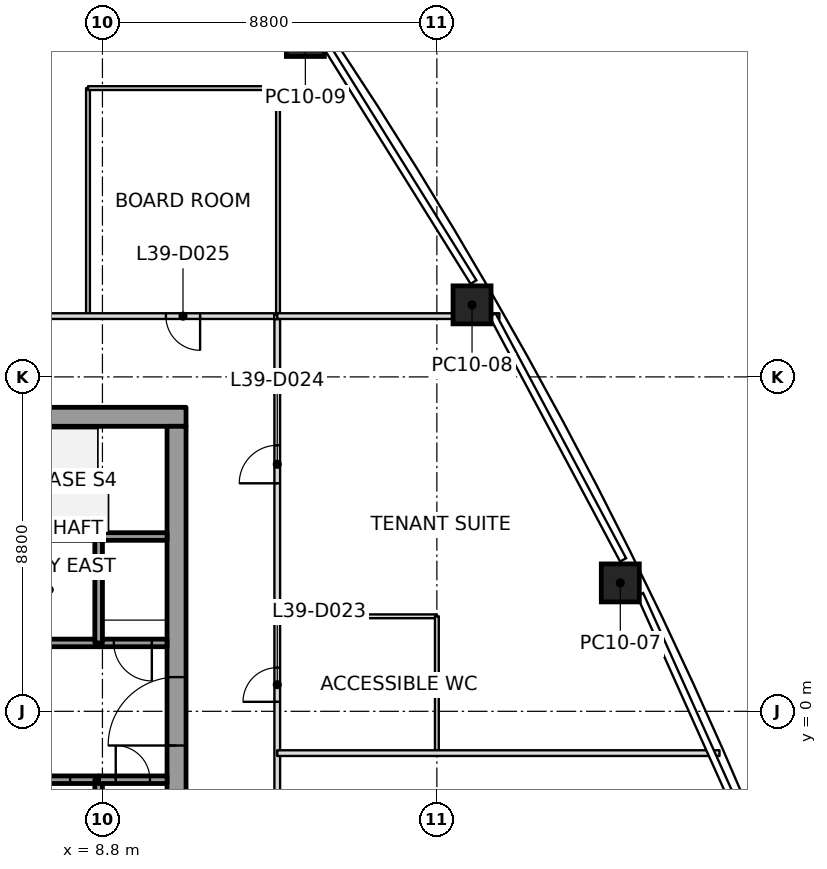
"""IFC4 building model, lengths in metres.
Left out: names, types, materials, properties, quantities, classifications, styles, units other than length and angle.
Written with IfcOpenShell. Run it as: python <this file> out.ifc"""

import sys

from ifc_helpers import new_model, si_unit, direction, frame, frame_2d, origin, origin_2d, place, context, subcontext, project, spatial, rectangle, extrude, element, fill, save


model = new_model("IFC4")
c1 = context("Model", 3, precision=1e-05, world=origin(), true_north=direction((0.0, 1.0)))
c2 = subcontext(c1, "Body", "Model", "MODEL_VIEW")
j1 = project(units=[si_unit("LENGTHUNIT", "METRE"), si_unit("PLANEANGLEUNIT", "RADIAN")], contexts=[c1])
p1 = place(None, origin())
s1 = spatial("IfcSite", under=j1, at=p1, CompositionType="ELEMENT")
p2 = place(p1, origin())
s2 = spatial("IfcBuilding", under=s1, at=p2, CompositionType="ELEMENT")
p3 = place(p2, frame((0.0, 0.0, 177.8)))
s3 = spatial("IfcBuildingStorey", under=s2, at=p3, CompositionType="ELEMENT", Elevation=177.8)
p4 = place(p3, frame((22.427, 3.379, 0.0), z_axis=(-0.014097689605, 0.002074984617, 0.999898469639), x_axis=(-0.440365548951, 0.897782283565, -0.008071840787)))
e1 = element("IfcColumn", 1, at=p4, inside=s3, PredefinedType="COLUMN", context=c2, shape_type="SweptSolid", body=[
    extrude(rectangle(XDim=1.0, YDim=1.0, at=origin_2d()), origin(), (0.0, 0.0, 1.0), 4.0),
])
p5 = place(p3, frame((18.525, 10.696, 0.0), z_axis=(-0.009887049298, -0.00573692984, 0.999934664812), x_axis=(-0.499975560967, 0.866039512843, 2.5126546e-05)))
e2 = element("IfcColumn", 2, at=p5, inside=s3, PredefinedType="COLUMN", context=c2, shape_type="SweptSolid", body=[
    extrude(rectangle(XDim=1.0, YDim=1.0, at=origin_2d()), origin(), (0.0, 0.0, 1.0), 4.0),
])
p6 = place(p3, frame((14.139, 17.733, 0.0), z_axis=(-0.005248490815, -0.013243284963, 0.999898529226), x_axis=(-0.557302763057, 0.830270127134, 0.008071324461)))
e3 = element("IfcColumn", 3, at=p6, inside=s3, PredefinedType="COLUMN", context=c2, shape_type="SweptSolid", body=[
    extrude(rectangle(XDim=1.0, YDim=1.0, at=origin_2d()), origin(), (0.0, 0.0, 1.0), 4.0),
])
p7 = place(p3, frame((-11.0, 7.75, 0.0), z_axis=(0.0, 0.0, 1.0), x_axis=(1.0, 0.0, 0.0)))
e4 = element("IfcWall", 4, at=p7, inside=s3, PredefinedType="SHEAR", context=c2, shape_type="SweptSolid", body=[
    extrude(rectangle(XDim=22.0, YDim=0.5, at=frame_2d((11.0, 0.0))), origin(), (0.0, 0.0, 1.0), 4.0),
])
p8 = place(p7, frame((10.45, 0.0, 0.0)))
e5 = element("IfcOpeningElement", 5, at=p8, cuts=e4, PredefinedType="OPENING", context=c2, shape_type="SweptSolid", body=[
    extrude(rectangle(XDim=1.1, YDim=2.1, at=frame_2d((0.55, 1.05))), frame((0.0, 0.25, 0.0), z_axis=(0.0, -1.0, 0.0), x_axis=(1.0, 0.0, 0.0)), (0.0, 0.0, 1.0), 0.5),
])
p9 = place(p3, frame((10.75, -7.5, 0.0), z_axis=(0.0, 0.0, 1.0), x_axis=(0.0, 1.0, 0.0)))
e6 = element("IfcWall", 6, at=p9, inside=s3, PredefinedType="SHEAR", context=c2, shape_type="SweptSolid", body=[
    extrude(rectangle(XDim=15.0, YDim=0.5, at=frame_2d((7.5, 0.0))), origin(), (0.0, 0.0, 1.0), 4.0),
])
p10 = place(p9, frame((6.6, 0.0, 0.0)))
e7 = element("IfcOpeningElement", 7, at=p10, cuts=e6, PredefinedType="OPENING", context=c2, shape_type="SweptSolid", body=[
    extrude(rectangle(XDim=1.8, YDim=2.1, at=frame_2d((0.9, 1.05))), frame((0.0, 0.25, 0.0), z_axis=(0.0, -1.0, 0.0), x_axis=(1.0, 0.0, 0.0)), (0.0, 0.0, 1.0), 0.5),
])
p11 = place(p3, frame((6.1, -1.8, 0.0), z_axis=(0.0, 0.0, 1.0), x_axis=(1.0, 0.0, 0.0)))
e8 = element("IfcWall", 8, at=p11, inside=s3, PredefinedType="SOLIDWALL", context=c2, shape_type="SweptSolid", body=[
    extrude(rectangle(XDim=2.6, YDim=0.2, at=frame_2d((1.3, 0.0))), origin(), (0.0, 0.0, 1.0), 3.85),
])
p12 = place(p11, frame((0.75, 0.0, 0.0)))
e9 = element("IfcOpeningElement", 9, at=p12, cuts=e8, PredefinedType="OPENING", context=c2, shape_type="SweptSolid", body=[
    extrude(rectangle(XDim=1.1, YDim=2.1, at=frame_2d((0.55, 1.05))), frame((0.0, 0.1, 0.0), z_axis=(0.0, -1.0, 0.0), x_axis=(1.0, 0.0, 0.0)), (0.0, 0.0, 1.0), 0.2),
])
for number, where, z_axis, x_axis in (
    (10, (8.7, 1.8, 0.0), (0.0, 0.0, 1.0), (-1.0, 0.0, 0.0)),
    (11, (8.7, 4.6, 0.0), (0.0, 0.0, 1.0), (-1.0, 0.0, 0.0)),
):
    element("IfcWall", number, at=place(p3, frame(where, z_axis=z_axis, x_axis=x_axis)), inside=s3, PredefinedType="SOLIDWALL", context=c2, shape_type="SweptSolid", body=[
        extrude(rectangle(XDim=2.6, YDim=0.2, at=frame_2d((1.3, 0.0))), origin(), (0.0, 0.0, 1.0), 3.85),
    ])
p13 = place(p3, frame((8.7, -1.8, 0.0), z_axis=(0.0, 0.0, 1.0), x_axis=(0.0, -1.0, 0.0)))
e12 = element("IfcWall", 12, at=p13, inside=s3, PredefinedType="SOLIDWALL", context=c2, shape_type="SweptSolid", body=[
    extrude(rectangle(XDim=2.8, YDim=0.2, at=frame_2d((1.4, 0.0))), origin(), (0.0, 0.0, 1.0), 3.85),
])
p14 = place(p3, frame((8.7, -1.8, 0.0), z_axis=(0.0, 0.0, 1.0), x_axis=(1.0, 0.0, 0.0)))
e13 = element("IfcWall", 13, at=p14, inside=s3, PredefinedType="SOLIDWALL", context=c2, shape_type="SweptSolid", body=[
    extrude(rectangle(XDim=1.8, YDim=0.2, at=frame_2d((0.9, 0.0))), origin(), (0.0, 0.0, 1.0), 3.85),
])
p15 = place(p14, frame((0.45, 0.0, 0.0)))
e14 = element("IfcOpeningElement", 14, at=p15, cuts=e13, PredefinedType="OPENING", context=c2, shape_type="SweptSolid", body=[
    extrude(rectangle(XDim=0.9, YDim=2.1, at=frame_2d((0.45, 1.05))), frame((0.0, 0.1, 0.0), z_axis=(0.0, -1.0, 0.0), x_axis=(1.0, 0.0, 0.0)), (0.0, 0.0, 1.0), 0.2),
])
p16 = place(p3, frame((10.5, 1.8, 0.0), z_axis=(0.0, 0.0, 1.0), x_axis=(-1.0, 0.0, 0.0)))
e15 = element("IfcWall", 15, at=p16, inside=s3, PredefinedType="SOLIDWALL", context=c2, shape_type="SweptSolid", body=[
    extrude(rectangle(XDim=1.8, YDim=0.2, at=frame_2d((0.9, 0.0))), origin(), (0.0, 0.0, 1.0), 3.85),
])
p17 = place(p16, frame((0.4, 0.0, 0.0)))
e16 = element("IfcOpeningElement", 16, at=p17, cuts=e15, PredefinedType="OPENING", context=c2, shape_type="SweptSolid", body=[
    extrude(rectangle(XDim=1.0, YDim=2.1, at=frame_2d((0.5, 1.05))), frame((0.0, 0.1, 0.0), z_axis=(0.0, -1.0, 0.0), x_axis=(1.0, 0.0, 0.0)), (0.0, 0.0, 1.0), 0.2),
])
p18 = place(p3, frame((8.7, 4.6, 0.0), z_axis=(0.0, 0.0, 1.0), x_axis=(0.0, -1.0, 0.0)))
e17 = element("IfcWall", 17, at=p18, inside=s3, PredefinedType="SOLIDWALL", context=c2, shape_type="SweptSolid", body=[
    extrude(rectangle(XDim=2.8, YDim=0.2, at=frame_2d((1.4, 0.0))), origin(), (0.0, 0.0, 1.0), 3.85),
])
p19 = place(p3, frame((10.5, 4.6, 0.0), z_axis=(0.0, 0.0, 1.0), x_axis=(-1.0, 0.0, 0.0)))
e18 = element("IfcWall", 18, at=p19, inside=s3, PredefinedType="SOLIDWALL", context=c2, shape_type="SweptSolid", body=[
    extrude(rectangle(XDim=1.8, YDim=0.2, at=frame_2d((0.9, 0.0))), origin(), (0.0, 0.0, 1.0), 3.85),
])
p20 = place(p3, frame((25.037, -1.1, 0.0), z_axis=(0.0, 0.0, 1.0), x_axis=(-1.0, 0.0, 0.0)))
e19 = element("IfcWall", 19, at=p20, inside=s3, PredefinedType="PARTITIONING", context=c2, shape_type="SweptSolid", body=[
    extrude(rectangle(XDim=11.637, YDim=0.15, at=frame_2d((5.819, 0.0))), origin(), (0.0, 0.0, 1.0), 3.234),
])
p21 = place(p3, frame((13.4, 10.4, 0.0), z_axis=(0.0, 0.0, 1.0), x_axis=(1.0, 0.0, 0.0)))
e20 = element("IfcWall", 20, at=p21, inside=s3, PredefinedType="PARTITIONING", context=c2, shape_type="SweptSolid", body=[
    extrude(rectangle(XDim=5.845, YDim=0.15, at=frame_2d((2.923, 0.0))), origin(), (0.0, 0.0, 1.0), 3.234),
])
p22 = place(p3, frame((13.32, 10.4, 0.0), z_axis=(0.0, 0.0, 1.0), x_axis=(-1.0, 0.0, 0.0)))
e21 = element("IfcWall", 21, at=p22, inside=s3, PredefinedType="PARTITIONING", context=c2, shape_type="SweptSolid", body=[
    extrude(rectangle(XDim=26.64, YDim=0.15, at=frame_2d((13.32, 0.0))), origin(), (0.0, 0.0, 1.0), 3.166),
])
p23 = place(p22, frame((1.95, 0.0, 0.0)))
e22 = element("IfcOpeningElement", 22, at=p23, cuts=e21, PredefinedType="OPENING", context=c2, shape_type="SweptSolid", body=[
    extrude(rectangle(XDim=0.9, YDim=2.1, at=frame_2d((0.45, 1.05))), frame((0.0, 0.075, 0.0), z_axis=(0.0, -1.0, 0.0), x_axis=(1.0, 0.0, 0.0)), (0.0, 0.0, 1.0), 0.15),
])
p24 = place(p22, frame((9.61, 0.0, 0.0)))
e23 = element("IfcOpeningElement", 23, at=p24, cuts=e21, PredefinedType="OPENING", context=c2, shape_type="SweptSolid", body=[
    extrude(rectangle(XDim=1.0, YDim=2.1, at=frame_2d((0.5, 1.05))), frame((0.0, 0.075, 0.0), z_axis=(0.0, -1.0, 0.0), x_axis=(1.0, 0.0, 0.0)), (0.0, 0.0, 1.0), 0.15),
])
p25 = place(p22, frame((16.87, 0.0, 0.0)))
e24 = element("IfcOpeningElement", 24, at=p25, cuts=e21, PredefinedType="OPENING", context=c2, shape_type="SweptSolid", body=[
    extrude(rectangle(XDim=0.9, YDim=2.1, at=frame_2d((0.45, 1.05))), frame((0.0, 0.075, 0.0), z_axis=(0.0, -1.0, 0.0), x_axis=(1.0, 0.0, 0.0)), (0.0, 0.0, 1.0), 0.15),
])
p26 = place(p22, frame((22.63, 0.0, 0.0)))
e25 = element("IfcOpeningElement", 25, at=p26, cuts=e21, PredefinedType="OPENING", context=c2, shape_type="SweptSolid", body=[
    extrude(rectangle(XDim=1.0, YDim=2.1, at=frame_2d((0.5, 1.05))), frame((0.0, 0.075, 0.0), z_axis=(0.0, -1.0, 0.0), x_axis=(1.0, 0.0, 0.0)), (0.0, 0.0, 1.0), 0.15),
])
p27 = place(p3, frame((13.4, -10.32, 0.0), z_axis=(0.0, 0.0, 1.0), x_axis=(0.0, 1.0, 0.0)))
e26 = element("IfcWall", 26, at=p27, inside=s3, PredefinedType="PARTITIONING", context=c2, shape_type="SweptSolid", body=[
    extrude(rectangle(XDim=20.64, YDim=0.15, at=frame_2d((10.32, 0.0))), origin(), (0.0, 0.0, 1.0), 3.166),
])
p28 = place(p27, frame((10.57, 0.0, 0.0)))
e27 = element("IfcOpeningElement", 27, at=p28, cuts=e26, PredefinedType="OPENING", context=c2, shape_type="SweptSolid", body=[
    extrude(rectangle(XDim=0.9, YDim=2.1, at=frame_2d((0.45, 1.05))), frame((0.0, 0.075, 0.0), z_axis=(0.0, -1.0, 0.0), x_axis=(1.0, 0.0, 0.0)), (0.0, 0.0, 1.0), 0.15),
])
p29 = place(p27, frame((16.32, 0.0, 0.0)))
e28 = element("IfcOpeningElement", 28, at=p29, cuts=e26, PredefinedType="OPENING", context=c2, shape_type="SweptSolid", body=[
    extrude(rectangle(XDim=1.0, YDim=2.1, at=frame_2d((0.5, 1.05))), frame((0.0, 0.075, 0.0), z_axis=(0.0, -1.0, 0.0), x_axis=(1.0, 0.0, 0.0)), (0.0, 0.0, 1.0), 0.15),
])
p30 = place(p27, frame((1.55, 0.0, 0.0)))
e29 = element("IfcOpeningElement", 29, at=p30, cuts=e26, PredefinedType="OPENING", context=c2, shape_type="SweptSolid", body=[
    extrude(rectangle(XDim=0.9, YDim=2.1, at=frame_2d((0.45, 1.05))), frame((0.0, 0.075, 0.0), z_axis=(0.0, -1.0, 0.0), x_axis=(1.0, 0.0, 0.0)), (0.0, 0.0, 1.0), 0.15),
])
p31 = place(p27, frame((6.21, 0.0, 0.0)))
e30 = element("IfcOpeningElement", 30, at=p31, cuts=e26, PredefinedType="OPENING", context=c2, shape_type="SweptSolid", body=[
    extrude(rectangle(XDim=1.0, YDim=2.1, at=frame_2d((0.5, 1.05))), frame((0.0, 0.075, 0.0), z_axis=(0.0, -1.0, 0.0), x_axis=(1.0, 0.0, 0.0)), (0.0, 0.0, 1.0), 0.15),
])
p32 = place(p3, frame((8.42, 10.43, 0.0), z_axis=(0.0, 0.0, 1.0), x_axis=(0.0, 1.0, 0.0)))
e31 = element("IfcWall", 31, at=p32, inside=s3, PredefinedType="PARTITIONING", context=c2, shape_type="SweptSolid", body=[
    extrude(rectangle(XDim=5.97, YDim=0.1, at=frame_2d((2.985, 0.0))), origin(), (0.0, 0.0, 1.0), 3.247),
])
p33 = place(p3, frame((8.42, 16.4, 0.0), z_axis=(0.0, 0.0, 1.0), x_axis=(1.0, 0.0, 0.0)))
e32 = element("IfcWall", 32, at=p33, inside=s3, PredefinedType="PARTITIONING", context=c2, shape_type="SweptSolid", body=[
    extrude(rectangle(XDim=5.0, YDim=0.1, at=frame_2d((2.5, 0.0))), origin(), (0.0, 0.0, 1.0), 3.247),
])
p34 = place(p3, frame((13.42, 16.4, 0.0), z_axis=(0.0, 0.0, 1.0), x_axis=(0.0, -1.0, 0.0)))
e33 = element("IfcWall", 33, at=p34, inside=s3, PredefinedType="PARTITIONING", context=c2, shape_type="SweptSolid", body=[
    extrude(rectangle(XDim=5.97, YDim=0.1, at=frame_2d((2.985, 0.0))), origin(), (0.0, 0.0, 1.0), 3.247),
])
p35 = place(p3, frame((13.43, 2.5, 0.0), z_axis=(0.0, 0.0, 1.0), x_axis=(1.0, 0.0, 0.0)))
e34 = element("IfcWall", 34, at=p35, inside=s3, PredefinedType="PARTITIONING", context=c2, shape_type="SweptSolid", body=[
    extrude(rectangle(XDim=4.17, YDim=0.1, at=frame_2d((2.085, 0.0))), origin(), (0.0, 0.0, 1.0), 3.393),
])
p36 = place(p3, frame((17.6, 2.5, 0.0), z_axis=(0.0, 0.0, 1.0), x_axis=(0.0, -1.0, 0.0)))
e35 = element("IfcWall", 35, at=p36, inside=s3, PredefinedType="PARTITIONING", context=c2, shape_type="SweptSolid", body=[
    extrude(rectangle(XDim=3.57, YDim=0.1, at=frame_2d((1.785, 0.0))), origin(), (0.0, 0.0, 1.0), 3.317),
])
p37 = place(p28, origin())
e36 = element("IfcDoor", 36, at=p37, inside=s3, OperationType="SINGLE_SWING_LEFT", PredefinedType="DOOR", context=c2, shape_type="SweptSolid", body=[
    extrude(rectangle(XDim=0.9, YDim=2.1, at=frame_2d((0.45, 1.05))), frame((0.0, 0.025, 0.0), z_axis=(0.0, -1.0, 0.0), x_axis=(1.0, 0.0, 0.0)), (0.0, 0.0, 1.0), 0.05),
])
fill(e27, e36)
p38 = place(p29, origin())
e37 = element("IfcDoor", 37, at=p38, inside=s3, OperationType="SINGLE_SWING_LEFT", PredefinedType="DOOR", context=c2, shape_type="SweptSolid", body=[
    extrude(rectangle(XDim=1.0, YDim=2.1, at=frame_2d((0.5, 1.05))), frame((0.0, 0.025, 0.0), z_axis=(0.0, -1.0, 0.0), x_axis=(1.0, 0.0, 0.0)), (0.0, 0.0, 1.0), 0.05),
])
fill(e28, e37)
p39 = place(p23, origin())
e38 = element("IfcDoor", 38, at=p39, inside=s3, OperationType="SINGLE_SWING_LEFT", PredefinedType="DOOR", context=c2, shape_type="SweptSolid", body=[
    extrude(rectangle(XDim=0.9, YDim=2.1, at=frame_2d((0.45, 1.05))), frame((0.0, 0.025, 0.0), z_axis=(0.0, -1.0, 0.0), x_axis=(1.0, 0.0, 0.0)), (0.0, 0.0, 1.0), 0.05),
])
fill(e22, e38)
p40 = place(p12, origin())
e39 = element("IfcDoor", 39, at=p40, inside=s3, OperationType="SLIDING_TO_RIGHT", PredefinedType="DOOR", context=c2, shape_type="SweptSolid", body=[
    extrude(rectangle(XDim=1.1, YDim=2.1, at=frame_2d((0.55, 1.05))), frame((0.0, 0.025, 0.0), z_axis=(0.0, -1.0, 0.0), x_axis=(1.0, 0.0, 0.0)), (0.0, 0.0, 1.0), 0.05),
])
fill(e9, e39)
p41 = place(p17, origin())
e40 = element("IfcDoor", 40, at=p41, inside=s3, OperationType="SINGLE_SWING_LEFT", PredefinedType="DOOR", context=c2, shape_type="SweptSolid", body=[
    extrude(rectangle(XDim=1.0, YDim=2.1, at=frame_2d((0.5, 1.05))), frame((0.0, 0.025, 0.0), z_axis=(0.0, -1.0, 0.0), x_axis=(1.0, 0.0, 0.0)), (0.0, 0.0, 1.0), 0.05),
])
fill(e16, e40)
p42 = place(p15, origin())
e41 = element("IfcDoor", 41, at=p42, inside=s3, OperationType="SINGLE_SWING_LEFT", PredefinedType="DOOR", context=c2, shape_type="SweptSolid", body=[
    extrude(rectangle(XDim=0.9, YDim=2.1, at=frame_2d((0.45, 1.05))), frame((0.0, 0.025, 0.0), z_axis=(0.0, -1.0, 0.0), x_axis=(1.0, 0.0, 0.0)), (0.0, 0.0, 1.0), 0.05),
])
fill(e14, e41)
p43 = place(p10, origin())
e42 = element("IfcDoor", 42, at=p43, inside=s3, OperationType="DOUBLE_DOOR_SINGLE_SWING", PredefinedType="DOOR", context=c2, shape_type="SweptSolid", body=[
    extrude(rectangle(XDim=1.8, YDim=2.1, at=frame_2d((0.9, 1.05))), frame((0.0, 0.025, 0.0), z_axis=(0.0, -1.0, 0.0), x_axis=(1.0, 0.0, 0.0)), (0.0, 0.0, 1.0), 0.05),
])
fill(e7, e42)
save(model, sys.argv[1])
